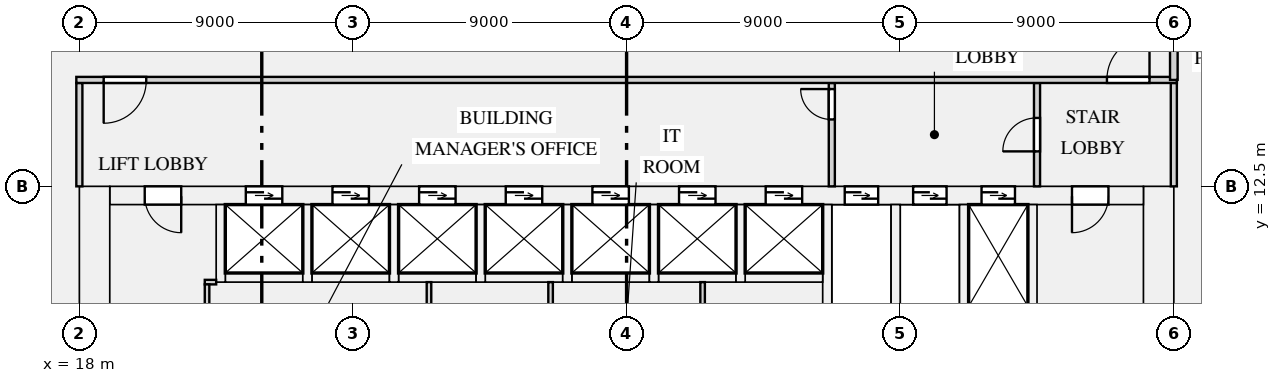
"""IFC4 building model, lengths in metres.
Left out: names, types, materials, properties, quantities, classifications, styles, units other than length and angle.
Written with IfcOpenShell. Run it as: python <this file> out.ifc"""

import sys

from ifc_helpers import new_model, si_unit, direction, frame, frame_2d, origin, place, context, subcontext, project, spatial, rectangle, extrude, element, fill, save


model = new_model("IFC4")
c1 = context("Model", 3, precision=1e-05, world=origin(), true_north=direction((0.0, 1.0)))
c2 = subcontext(c1, "Body", "Model", "MODEL_VIEW")
j1 = project(units=[si_unit("LENGTHUNIT", "METRE"), si_unit("PLANEANGLEUNIT", "RADIAN")], contexts=[c1])
p1 = place(None, origin())
s1 = spatial("IfcSite", under=j1, at=p1, CompositionType="ELEMENT")
p2 = place(p1, origin())
s2 = spatial("IfcBuilding", under=s1, at=p2, CompositionType="ELEMENT")
p3 = place(p2, origin())
s3 = spatial("IfcBuildingStorey", under=s2, at=p3, CompositionType="ELEMENT", Elevation=0.0)
for number, where, z_axis, x_axis in (
    (1, (18.5, 0.0, 0.0), (0.0, 0.0, 1.0), (0.0, 1.0, 0.0)),
    (2, (53.5, 0.0, 0.0), (0.0, 0.0, 1.0), (0.0, 1.0, 0.0)),
):
    element("IfcWall", number, at=place(p3, frame(where, z_axis=z_axis, x_axis=x_axis)), inside=s3, PredefinedType="SHEAR", context=c2, shape_type="SweptSolid", body=[
        extrude(rectangle(XDim=12.5, YDim=1.0, at=frame_2d((6.25, 0.0))), origin(), (0.0, 0.0, 1.0), 6.5),
    ])
p4 = place(p3, frame((19.0, 12.2, 0.0), z_axis=(0.0, 0.0, 1.0), x_axis=(1.0, 0.0, 0.0)))
e3 = element("IfcWall", 3, at=p4, inside=s3, PredefinedType="SHEAR", context=c2, shape_type="SweptSolid", body=[
    extrude(rectangle(XDim=34.0, YDim=0.6, at=frame_2d((17.0, 0.0))), origin(), (0.0, 0.0, 1.0), 6.5),
])
p5 = place(p4, frame((4.475, 0.0, 0.0)))
e4 = element("IfcOpeningElement", 4, at=p5, cuts=e3, PredefinedType="OPENING", context=c2, shape_type="SweptSolid", body=[
    extrude(rectangle(XDim=1.2, YDim=2.1, at=frame_2d((0.6, 1.05))), frame((0.0, 0.31, 0.0), z_axis=(0.0, -1.0, 0.0), x_axis=(1.0, 0.0, 0.0)), (0.0, 0.0, 1.0), 0.62),
])
p6 = place(p4, frame((7.325, 0.0, 0.0)))
e5 = element("IfcOpeningElement", 5, at=p6, cuts=e3, PredefinedType="OPENING", context=c2, shape_type="SweptSolid", body=[
    extrude(rectangle(XDim=1.2, YDim=2.1, at=frame_2d((0.6, 1.05))), frame((0.0, 0.31, 0.0), z_axis=(0.0, -1.0, 0.0), x_axis=(1.0, 0.0, 0.0)), (0.0, 0.0, 1.0), 0.62),
])
p7 = place(p4, frame((10.175, 0.0, 0.0)))
e6 = element("IfcOpeningElement", 6, at=p7, cuts=e3, PredefinedType="OPENING", context=c2, shape_type="SweptSolid", body=[
    extrude(rectangle(XDim=1.2, YDim=2.1, at=frame_2d((0.6, 1.05))), frame((0.0, 0.31, 0.0), z_axis=(0.0, -1.0, 0.0), x_axis=(1.0, 0.0, 0.0)), (0.0, 0.0, 1.0), 0.62),
])
p8 = place(p4, frame((13.025, 0.0, 0.0)))
e7 = element("IfcOpeningElement", 7, at=p8, cuts=e3, PredefinedType="OPENING", context=c2, shape_type="SweptSolid", body=[
    extrude(rectangle(XDim=1.2, YDim=2.1, at=frame_2d((0.6, 1.05))), frame((0.0, 0.31, 0.0), z_axis=(0.0, -1.0, 0.0), x_axis=(1.0, 0.0, 0.0)), (0.0, 0.0, 1.0), 0.62),
])
p9 = place(p4, frame((15.875, 0.0, 0.0)))
e8 = element("IfcOpeningElement", 8, at=p9, cuts=e3, PredefinedType="OPENING", context=c2, shape_type="SweptSolid", body=[
    extrude(rectangle(XDim=1.2, YDim=2.1, at=frame_2d((0.6, 1.05))), frame((0.0, 0.31, 0.0), z_axis=(0.0, -1.0, 0.0), x_axis=(1.0, 0.0, 0.0)), (0.0, 0.0, 1.0), 0.62),
])
p10 = place(p4, frame((18.725, 0.0, 0.0)))
e9 = element("IfcOpeningElement", 9, at=p10, cuts=e3, PredefinedType="OPENING", context=c2, shape_type="SweptSolid", body=[
    extrude(rectangle(XDim=1.2, YDim=2.1, at=frame_2d((0.6, 1.05))), frame((0.0, 0.31, 0.0), z_axis=(0.0, -1.0, 0.0), x_axis=(1.0, 0.0, 0.0)), (0.0, 0.0, 1.0), 0.62),
])
p11 = place(p4, frame((21.575, 0.0, 0.0)))
e10 = element("IfcOpeningElement", 10, at=p11, cuts=e3, PredefinedType="OPENING", context=c2, shape_type="SweptSolid", body=[
    extrude(rectangle(XDim=1.2, YDim=2.1, at=frame_2d((0.6, 1.05))), frame((0.0, 0.31, 0.0), z_axis=(0.0, -1.0, 0.0), x_axis=(1.0, 0.0, 0.0)), (0.0, 0.0, 1.0), 0.62),
])
p12 = place(p4, frame((24.175, 0.0, 0.0)))
e11 = element("IfcOpeningElement", 11, at=p12, cuts=e3, PredefinedType="OPENING", context=c2, shape_type="SweptSolid", body=[
    extrude(rectangle(XDim=1.1, YDim=2.1, at=frame_2d((0.55, 1.05))), frame((0.0, 0.31, 0.0), z_axis=(0.0, -1.0, 0.0), x_axis=(1.0, 0.0, 0.0)), (0.0, 0.0, 1.0), 0.62),
])
p13 = place(p4, frame((26.425, 0.0, 0.0)))
e12 = element("IfcOpeningElement", 12, at=p13, cuts=e3, PredefinedType="OPENING", context=c2, shape_type="SweptSolid", body=[
    extrude(rectangle(XDim=1.1, YDim=2.1, at=frame_2d((0.55, 1.05))), frame((0.0, 0.31, 0.0), z_axis=(0.0, -1.0, 0.0), x_axis=(1.0, 0.0, 0.0)), (0.0, 0.0, 1.0), 0.62),
])
p14 = place(p4, frame((28.675, 0.0, 0.0)))
e13 = element("IfcOpeningElement", 13, at=p14, cuts=e3, PredefinedType="OPENING", context=c2, shape_type="SweptSolid", body=[
    extrude(rectangle(XDim=1.1, YDim=2.1, at=frame_2d((0.55, 1.05))), frame((0.0, 0.31, 0.0), z_axis=(0.0, -1.0, 0.0), x_axis=(1.0, 0.0, 0.0)), (0.0, 0.0, 1.0), 0.62),
])
p15 = place(p4, frame((1.15, 0.0, 0.0)))
e14 = element("IfcOpeningElement", 14, at=p15, cuts=e3, PredefinedType="OPENING", context=c2, shape_type="SweptSolid", body=[
    extrude(rectangle(XDim=1.2, YDim=2.1, at=frame_2d((0.6, 1.05))), frame((0.0, 0.31, 0.0), z_axis=(0.0, -1.0, 0.0), x_axis=(1.0, 0.0, 0.0)), (0.0, 0.0, 1.0), 0.62),
])
p16 = place(p4, frame((31.65, 0.0, 0.0)))
e15 = element("IfcOpeningElement", 15, at=p16, cuts=e3, PredefinedType="OPENING", context=c2, shape_type="SweptSolid", body=[
    extrude(rectangle(XDim=1.2, YDim=2.1, at=frame_2d((0.6, 1.05))), frame((0.0, 0.31, 0.0), z_axis=(0.0, -1.0, 0.0), x_axis=(1.0, 0.0, 0.0)), (0.0, 0.0, 1.0), 0.62),
])
p17 = place(p3, frame((22.8, 9.5, 0.0), z_axis=(0.0, 0.0, 1.0), x_axis=(1.0, 0.0, 0.0)))
e16 = element("IfcWall", 16, at=p17, inside=s3, PredefinedType="SHEAR", context=c2, shape_type="SweptSolid", body=[
    extrude(rectangle(XDim=2.55, YDim=0.3, at=frame_2d((1.275, 0.0))), origin(), (0.0, 0.0, 1.0), 6.5),
])
p18 = place(p3, frame((22.65, 9.35, 0.0), z_axis=(0.0, 0.0, 1.0), x_axis=(0.0, 1.0, 0.0)))
e17 = element("IfcWall", 17, at=p18, inside=s3, PredefinedType="SHEAR", context=c2, shape_type="SweptSolid", body=[
    extrude(rectangle(XDim=2.55, YDim=0.3, at=frame_2d((1.275, 0.0))), origin(), (0.0, 0.0, 1.0), 6.5),
])
p19 = place(p3, frame((25.65, 9.5, 0.0), z_axis=(0.0, 0.0, 1.0), x_axis=(1.0, 0.0, 0.0)))
e18 = element("IfcWall", 18, at=p19, inside=s3, PredefinedType="SHEAR", context=c2, shape_type="SweptSolid", body=[
    extrude(rectangle(XDim=2.55, YDim=0.3, at=frame_2d((1.275, 0.0))), origin(), (0.0, 0.0, 1.0), 6.5),
])
p20 = place(p3, frame((25.5, 9.35, 0.0), z_axis=(0.0, 0.0, 1.0), x_axis=(0.0, 1.0, 0.0)))
e19 = element("IfcWall", 19, at=p20, inside=s3, PredefinedType="SHEAR", context=c2, shape_type="SweptSolid", body=[
    extrude(rectangle(XDim=2.55, YDim=0.3, at=frame_2d((1.275, 0.0))), origin(), (0.0, 0.0, 1.0), 6.5),
])
p21 = place(p3, frame((28.5, 9.5, 0.0), z_axis=(0.0, 0.0, 1.0), x_axis=(1.0, 0.0, 0.0)))
e20 = element("IfcWall", 20, at=p21, inside=s3, PredefinedType="SHEAR", context=c2, shape_type="SweptSolid", body=[
    extrude(rectangle(XDim=2.55, YDim=0.3, at=frame_2d((1.275, 0.0))), origin(), (0.0, 0.0, 1.0), 6.5),
])
for number, where, z_axis, x_axis in (
    (21, (28.35, 9.35, 0.0), (0.0, 0.0, 1.0), (0.0, 1.0, 0.0)),
    (22, (31.35, 9.5, 0.0), (0.0, 0.0, 1.0), (1.0, 0.0, 0.0)),
    (23, (31.2, 9.35, 0.0), (0.0, 0.0, 1.0), (0.0, 1.0, 0.0)),
):
    element("IfcWall", number, at=place(p3, frame(where, z_axis=z_axis, x_axis=x_axis)), inside=s3, PredefinedType="SHEAR", context=c2, shape_type="SweptSolid", body=[
        extrude(rectangle(XDim=2.55, YDim=0.3, at=frame_2d((1.275, 0.0))), origin(), (0.0, 0.0, 1.0), 6.5),
    ])
p22 = place(p3, frame((34.2, 9.5, 0.0), z_axis=(0.0, 0.0, 1.0), x_axis=(1.0, 0.0, 0.0)))
e24 = element("IfcWall", 24, at=p22, inside=s3, PredefinedType="SHEAR", context=c2, shape_type="SweptSolid", body=[
    extrude(rectangle(XDim=2.55, YDim=0.3, at=frame_2d((1.275, 0.0))), origin(), (0.0, 0.0, 1.0), 6.5),
])
p23 = place(p3, frame((34.05, 9.35, 0.0), z_axis=(0.0, 0.0, 1.0), x_axis=(0.0, 1.0, 0.0)))
e25 = element("IfcWall", 25, at=p23, inside=s3, PredefinedType="SHEAR", context=c2, shape_type="SweptSolid", body=[
    extrude(rectangle(XDim=2.55, YDim=0.3, at=frame_2d((1.275, 0.0))), origin(), (0.0, 0.0, 1.0), 6.5),
])
p24 = place(p3, frame((37.05, 9.5, 0.0), z_axis=(0.0, 0.0, 1.0), x_axis=(1.0, 0.0, 0.0)))
e26 = element("IfcWall", 26, at=p24, inside=s3, PredefinedType="SHEAR", context=c2, shape_type="SweptSolid", body=[
    extrude(rectangle(XDim=2.55, YDim=0.3, at=frame_2d((1.275, 0.0))), origin(), (0.0, 0.0, 1.0), 6.5),
])
p25 = place(p3, frame((36.9, 9.35, 0.0), z_axis=(0.0, 0.0, 1.0), x_axis=(0.0, 1.0, 0.0)))
e27 = element("IfcWall", 27, at=p25, inside=s3, PredefinedType="SHEAR", context=c2, shape_type="SweptSolid", body=[
    extrude(rectangle(XDim=2.55, YDim=0.3, at=frame_2d((1.275, 0.0))), origin(), (0.0, 0.0, 1.0), 6.5),
])
p26 = place(p3, frame((39.9, 9.5, 0.0), z_axis=(0.0, 0.0, 1.0), x_axis=(1.0, 0.0, 0.0)))
e28 = element("IfcWall", 28, at=p26, inside=s3, PredefinedType="SHEAR", context=c2, shape_type="SweptSolid", body=[
    extrude(rectangle(XDim=2.55, YDim=0.3, at=frame_2d((1.275, 0.0))), origin(), (0.0, 0.0, 1.0), 6.5),
])
p27 = place(p3, frame((39.75, 9.35, 0.0), z_axis=(0.0, 0.0, 1.0), x_axis=(0.0, 1.0, 0.0)))
e29 = element("IfcWall", 29, at=p27, inside=s3, PredefinedType="SHEAR", context=c2, shape_type="SweptSolid", body=[
    extrude(rectangle(XDim=2.55, YDim=0.3, at=frame_2d((1.275, 0.0))), origin(), (0.0, 0.0, 1.0), 6.5),
])
for number, where, z_axis, x_axis in (
    (30, (42.6, 8.25, 0.0), (0.0, 0.0, 1.0), (0.0, 1.0, 0.0)),
    (31, (44.85, 8.25, 0.0), (0.0, 0.0, 1.0), (0.0, 1.0, 0.0)),
    (32, (47.1, 8.25, 0.0), (0.0, 0.0, 1.0), (0.0, 1.0, 0.0)),
    (33, (49.35, 8.25, 0.0), (0.0, 0.0, 1.0), (0.0, 1.0, 0.0)),
):
    element("IfcWall", number, at=place(p3, frame(where, z_axis=z_axis, x_axis=x_axis)), inside=s3, PredefinedType="SHEAR", context=c2, shape_type="SweptSolid", body=[
        extrude(rectangle(XDim=3.65, YDim=0.3, at=frame_2d((1.825, 0.0))), origin(), (0.0, 0.0, 1.0), 6.5),
    ])
p28 = place(p3, frame((22.125, 9.35, 0.0), z_axis=(0.0, 0.0, 1.0), x_axis=(1.0, 0.0, 0.0)))
e34 = element("IfcWall", 34, at=p28, inside=s3, PredefinedType="PARTITIONING", context=c2, shape_type="SweptSolid", body=[
    extrude(rectangle(XDim=0.375, YDim=0.15, at=frame_2d((0.188, 0.0))), origin(), (0.0, 0.0, 1.0), 6.098),
])
p29 = place(p3, frame((22.2, 6.725, 0.0), z_axis=(0.0, 0.0, 1.0), x_axis=(0.0, 1.0, 0.0)))
e35 = element("IfcWall", 35, at=p29, inside=s3, PredefinedType="PARTITIONING", context=c2, shape_type="SweptSolid", body=[
    extrude(rectangle(XDim=2.55, YDim=0.15, at=frame_2d((1.275, 0.0))), origin(), (0.0, 0.0, 1.0), 6.098),
])
for number, where, z_axis, x_axis in (
    (36, (29.5, 6.725, 0.0), (0.0, 0.0, 1.0), (0.0, 1.0, 0.0)),
    (37, (33.5, 6.725, 0.0), (0.0, 0.0, 1.0), (0.0, 1.0, 0.0)),
    (38, (38.5, 6.725, 0.0), (0.0, 0.0, 1.0), (0.0, 1.0, 0.0)),
):
    element("IfcWall", number, at=place(p3, frame(where, z_axis=z_axis, x_axis=x_axis)), inside=s3, PredefinedType="PARTITIONING", context=c2, shape_type="SweptSolid", body=[
        extrude(rectangle(XDim=2.625, YDim=0.15, at=frame_2d((1.312, 0.0))), origin(), (0.0, 0.0, 1.0), 6.098),
    ])
p30 = place(p3, frame((18.0, 12.5, 0.0), z_axis=(0.0, 0.0, 1.0), x_axis=(0.0, 1.0, 0.0)))
e39 = element("IfcWall", 39, at=p30, inside=s3, PredefinedType="PARTITIONING", context=c2, shape_type="SweptSolid", body=[
    extrude(rectangle(XDim=3.4, YDim=0.2, at=frame_2d((1.7, 0.0))), origin(), (0.0, 0.0, 1.0), 6.098),
])
p31 = place(p3, frame((42.75, 12.5, 0.0), z_axis=(0.0, 0.0, 1.0), x_axis=(0.0, 1.0, 0.0)))
e40 = element("IfcWall", 40, at=p31, inside=s3, PredefinedType="PARTITIONING", context=c2, shape_type="SweptSolid", body=[
    extrude(rectangle(XDim=3.4, YDim=0.2, at=frame_2d((1.7, 0.0))), origin(), (0.0, 0.0, 1.0), 6.098),
])
p32 = place(p31, frame((2.2, 0.0, 0.0)))
e41 = element("IfcOpeningElement", 41, at=p32, cuts=e40, PredefinedType="OPENING", context=c2, shape_type="SweptSolid", body=[
    extrude(rectangle(XDim=1.0, YDim=2.1, at=frame_2d((0.5, 1.05))), frame((0.0, 0.11, 0.0), z_axis=(0.0, -1.0, 0.0), x_axis=(1.0, 0.0, 0.0)), (0.0, 0.0, 1.0), 0.22),
])
p33 = place(p3, frame((49.5, 12.5, 0.0), z_axis=(0.0, 0.0, 1.0), x_axis=(0.0, 1.0, 0.0)))
e42 = element("IfcWall", 42, at=p33, inside=s3, PredefinedType="PARTITIONING", context=c2, shape_type="SweptSolid", body=[
    extrude(rectangle(XDim=3.4, YDim=0.2, at=frame_2d((1.7, 0.0))), origin(), (0.0, 0.0, 1.0), 6.098),
])
p34 = place(p33, frame((1.15, 0.0, 0.0)))
e43 = element("IfcOpeningElement", 43, at=p34, cuts=e42, PredefinedType="OPENING", context=c2, shape_type="SweptSolid", body=[
    extrude(rectangle(XDim=1.1, YDim=2.1, at=frame_2d((0.55, 1.05))), frame((0.0, 0.11, 0.0), z_axis=(0.0, -1.0, 0.0), x_axis=(1.0, 0.0, 0.0)), (0.0, 0.0, 1.0), 0.22),
])
p35 = place(p3, frame((54.0, 12.5, 0.0), z_axis=(0.0, 0.0, 1.0), x_axis=(0.0, 1.0, 0.0)))
e44 = element("IfcWall", 44, at=p35, inside=s3, PredefinedType="PARTITIONING", context=c2, shape_type="SweptSolid", body=[
    extrude(rectangle(XDim=3.4, YDim=0.2, at=frame_2d((1.7, 0.0))), origin(), (0.0, 0.0, 1.0), 6.098),
])
p36 = place(p3, frame((17.9, 16.0, 0.0), z_axis=(0.0, 0.0, 1.0), x_axis=(1.0, 0.0, 0.0)))
e45 = element("IfcWall", 45, at=p36, inside=s3, PredefinedType="PARTITIONING", context=c2, shape_type="SweptSolid", body=[
    extrude(rectangle(XDim=36.2, YDim=0.2, at=frame_2d((18.1, 0.0))), origin(), (0.0, 0.0, 1.0), 6.098),
])
p37 = place(p36, frame((0.9, 0.0, 0.0)))
e46 = element("IfcOpeningElement", 46, at=p37, cuts=e45, PredefinedType="OPENING", context=c2, shape_type="SweptSolid", body=[
    extrude(rectangle(XDim=1.4, YDim=2.1, at=frame_2d((0.7, 1.05))), frame((0.0, 0.11, 0.0), z_axis=(0.0, -1.0, 0.0), x_axis=(1.0, 0.0, 0.0)), (0.0, 0.0, 1.0), 0.22),
])
p38 = place(p36, frame((33.9, 0.0, 0.0)))
e47 = element("IfcOpeningElement", 47, at=p38, cuts=e45, PredefinedType="OPENING", context=c2, shape_type="SweptSolid", body=[
    extrude(rectangle(XDim=1.4, YDim=2.1, at=frame_2d((0.7, 1.05))), frame((0.0, 0.11, 0.0), z_axis=(0.0, -1.0, 0.0), x_axis=(1.0, 0.0, 0.0)), (0.0, 0.0, 1.0), 0.22),
])
p39 = place(p3, frame((54.0, 16.0, 0.0), z_axis=(0.0, 0.0, 1.0), x_axis=(0.0, 1.0, 0.0)))
e48 = element("IfcWall", 48, at=p39, inside=s3, PredefinedType="PARTITIONING", context=c2, shape_type="SweptSolid", body=[
    extrude(rectangle(XDim=8.0, YDim=0.25, at=frame_2d((4.0, 0.0))), origin(), (0.0, 0.0, 1.0), 6.098),
])
p40 = place(p39, frame((3.1, 0.0, 0.0)))
e49 = element("IfcOpeningElement", 49, at=p40, cuts=e48, PredefinedType="OPENING", context=c2, shape_type="SweptSolid", body=[
    extrude(rectangle(XDim=1.8, YDim=2.4, at=frame_2d((0.9, 1.2))), frame((0.0, 0.135, 0.0), z_axis=(0.0, -1.0, 0.0), x_axis=(1.0, 0.0, 0.0)), (0.0, 0.0, 1.0), 0.27),
])
p41 = place(p5, origin())
e50 = element("IfcDoor", 50, at=p41, inside=s3, OperationType="DOUBLE_DOOR_SLIDING", PredefinedType="DOOR", context=c2, shape_type="SweptSolid", body=[
    extrude(rectangle(XDim=1.2, YDim=2.1, at=frame_2d((0.6, 1.05))), frame((0.0, 0.025, 0.0), z_axis=(0.0, -1.0, 0.0), x_axis=(1.0, 0.0, 0.0)), (0.0, 0.0, 1.0), 0.05),
])
fill(e4, e50)
p42 = place(p6, origin())
e51 = element("IfcDoor", 51, at=p42, inside=s3, OperationType="DOUBLE_DOOR_SLIDING", PredefinedType="DOOR", context=c2, shape_type="SweptSolid", body=[
    extrude(rectangle(XDim=1.2, YDim=2.1, at=frame_2d((0.6, 1.05))), frame((0.0, 0.025, 0.0), z_axis=(0.0, -1.0, 0.0), x_axis=(1.0, 0.0, 0.0)), (0.0, 0.0, 1.0), 0.05),
])
fill(e5, e51)
p43 = place(p7, origin())
e52 = element("IfcDoor", 52, at=p43, inside=s3, OperationType="DOUBLE_DOOR_SLIDING", PredefinedType="DOOR", context=c2, shape_type="SweptSolid", body=[
    extrude(rectangle(XDim=1.2, YDim=2.1, at=frame_2d((0.6, 1.05))), frame((0.0, 0.025, 0.0), z_axis=(0.0, -1.0, 0.0), x_axis=(1.0, 0.0, 0.0)), (0.0, 0.0, 1.0), 0.05),
])
fill(e6, e52)
p44 = place(p8, origin())
e53 = element("IfcDoor", 53, at=p44, inside=s3, OperationType="DOUBLE_DOOR_SLIDING", PredefinedType="DOOR", context=c2, shape_type="SweptSolid", body=[
    extrude(rectangle(XDim=1.2, YDim=2.1, at=frame_2d((0.6, 1.05))), frame((0.0, 0.025, 0.0), z_axis=(0.0, -1.0, 0.0), x_axis=(1.0, 0.0, 0.0)), (0.0, 0.0, 1.0), 0.05),
])
fill(e7, e53)
p45 = place(p9, origin())
e54 = element("IfcDoor", 54, at=p45, inside=s3, OperationType="DOUBLE_DOOR_SLIDING", PredefinedType="DOOR", context=c2, shape_type="SweptSolid", body=[
    extrude(rectangle(XDim=1.2, YDim=2.1, at=frame_2d((0.6, 1.05))), frame((0.0, 0.025, 0.0), z_axis=(0.0, -1.0, 0.0), x_axis=(1.0, 0.0, 0.0)), (0.0, 0.0, 1.0), 0.05),
])
fill(e8, e54)
p46 = place(p10, origin())
e55 = element("IfcDoor", 55, at=p46, inside=s3, OperationType="DOUBLE_DOOR_SLIDING", PredefinedType="DOOR", context=c2, shape_type="SweptSolid", body=[
    extrude(rectangle(XDim=1.2, YDim=2.1, at=frame_2d((0.6, 1.05))), frame((0.0, 0.025, 0.0), z_axis=(0.0, -1.0, 0.0), x_axis=(1.0, 0.0, 0.0)), (0.0, 0.0, 1.0), 0.05),
])
fill(e9, e55)
p47 = place(p11, origin())
e56 = element("IfcDoor", 56, at=p47, inside=s3, OperationType="DOUBLE_DOOR_SLIDING", PredefinedType="DOOR", context=c2, shape_type="SweptSolid", body=[
    extrude(rectangle(XDim=1.2, YDim=2.1, at=frame_2d((0.6, 1.05))), frame((0.0, 0.025, 0.0), z_axis=(0.0, -1.0, 0.0), x_axis=(1.0, 0.0, 0.0)), (0.0, 0.0, 1.0), 0.05),
])
fill(e10, e56)
p48 = place(p12, origin())
e57 = element("IfcDoor", 57, at=p48, inside=s3, OperationType="DOUBLE_DOOR_SLIDING", PredefinedType="DOOR", context=c2, shape_type="SweptSolid", body=[
    extrude(rectangle(XDim=1.1, YDim=2.1, at=frame_2d((0.55, 1.05))), frame((0.0, 0.025, 0.0), z_axis=(0.0, -1.0, 0.0), x_axis=(1.0, 0.0, 0.0)), (0.0, 0.0, 1.0), 0.05),
])
fill(e11, e57)
p49 = place(p13, origin())
e58 = element("IfcDoor", 58, at=p49, inside=s3, OperationType="DOUBLE_DOOR_SLIDING", PredefinedType="DOOR", context=c2, shape_type="SweptSolid", body=[
    extrude(rectangle(XDim=1.1, YDim=2.1, at=frame_2d((0.55, 1.05))), frame((0.0, 0.025, 0.0), z_axis=(0.0, -1.0, 0.0), x_axis=(1.0, 0.0, 0.0)), (0.0, 0.0, 1.0), 0.05),
])
fill(e12, e58)
p50 = place(p14, origin())
e59 = element("IfcDoor", 59, at=p50, inside=s3, OperationType="DOUBLE_DOOR_SLIDING", PredefinedType="DOOR", context=c2, shape_type="SweptSolid", body=[
    extrude(rectangle(XDim=1.1, YDim=2.1, at=frame_2d((0.55, 1.05))), frame((0.0, 0.025, 0.0), z_axis=(0.0, -1.0, 0.0), x_axis=(1.0, 0.0, 0.0)), (0.0, 0.0, 1.0), 0.05),
])
fill(e13, e59)
p51 = place(p15, frame((1.2, 0.0, 0.0), z_axis=(0.0, 0.0, 1.0), x_axis=(-1.0, 0.0, 0.0)))
e60 = element("IfcDoor", 60, at=p51, inside=s3, OperationType="SINGLE_SWING_LEFT", PredefinedType="DOOR", context=c2, shape_type="SweptSolid", body=[
    extrude(rectangle(XDim=1.2, YDim=2.1, at=frame_2d((0.6, 1.05))), frame((0.0, 0.025, 0.0), z_axis=(0.0, -1.0, 0.0), x_axis=(1.0, 0.0, 0.0)), (0.0, 0.0, 1.0), 0.05),
])
fill(e14, e60)
p52 = place(p16, frame((1.2, 0.0, 0.0), z_axis=(0.0, 0.0, 1.0), x_axis=(-1.0, 0.0, 0.0)))
e61 = element("IfcDoor", 61, at=p52, inside=s3, OperationType="SINGLE_SWING_RIGHT", PredefinedType="DOOR", context=c2, shape_type="SweptSolid", body=[
    extrude(rectangle(XDim=1.2, YDim=2.1, at=frame_2d((0.6, 1.05))), frame((0.0, 0.025, 0.0), z_axis=(0.0, -1.0, 0.0), x_axis=(1.0, 0.0, 0.0)), (0.0, 0.0, 1.0), 0.05),
])
fill(e15, e61)
p53 = place(p32, origin())
e62 = element("IfcDoor", 62, at=p53, inside=s3, OperationType="SINGLE_SWING_RIGHT", PredefinedType="DOOR", context=c2, shape_type="SweptSolid", body=[
    extrude(rectangle(XDim=1.0, YDim=2.1, at=frame_2d((0.5, 1.05))), frame((0.0, 0.025, 0.0), z_axis=(0.0, -1.0, 0.0), x_axis=(1.0, 0.0, 0.0)), (0.0, 0.0, 1.0), 0.05),
])
fill(e41, e62)
p54 = place(p34, origin())
e63 = element("IfcDoor", 63, at=p54, inside=s3, OperationType="SINGLE_SWING_LEFT", PredefinedType="DOOR", context=c2, shape_type="SweptSolid", body=[
    extrude(rectangle(XDim=1.1, YDim=2.1, at=frame_2d((0.55, 1.05))), frame((0.0, 0.025, 0.0), z_axis=(0.0, -1.0, 0.0), x_axis=(1.0, 0.0, 0.0)), (0.0, 0.0, 1.0), 0.05),
])
fill(e43, e63)
p55 = place(p37, frame((1.4, 0.0, 0.0), z_axis=(0.0, 0.0, 1.0), x_axis=(-1.0, 0.0, 0.0)))
e64 = element("IfcDoor", 64, at=p55, inside=s3, OperationType="SINGLE_SWING_RIGHT", PredefinedType="DOOR", context=c2, shape_type="SweptSolid", body=[
    extrude(rectangle(XDim=1.4, YDim=2.1, at=frame_2d((0.7, 1.05))), frame((0.0, 0.025, 0.0), z_axis=(0.0, -1.0, 0.0), x_axis=(1.0, 0.0, 0.0)), (0.0, 0.0, 1.0), 0.05),
])
fill(e46, e64)
p56 = place(p38, origin())
e65 = element("IfcDoor", 65, at=p56, inside=s3, OperationType="SINGLE_SWING_RIGHT", PredefinedType="DOOR", context=c2, shape_type="SweptSolid", body=[
    extrude(rectangle(XDim=1.4, YDim=2.1, at=frame_2d((0.7, 1.05))), frame((0.0, 0.025, 0.0), z_axis=(0.0, -1.0, 0.0), x_axis=(1.0, 0.0, 0.0)), (0.0, 0.0, 1.0), 0.05),
])
fill(e47, e65)
save(model, sys.argv[1])
